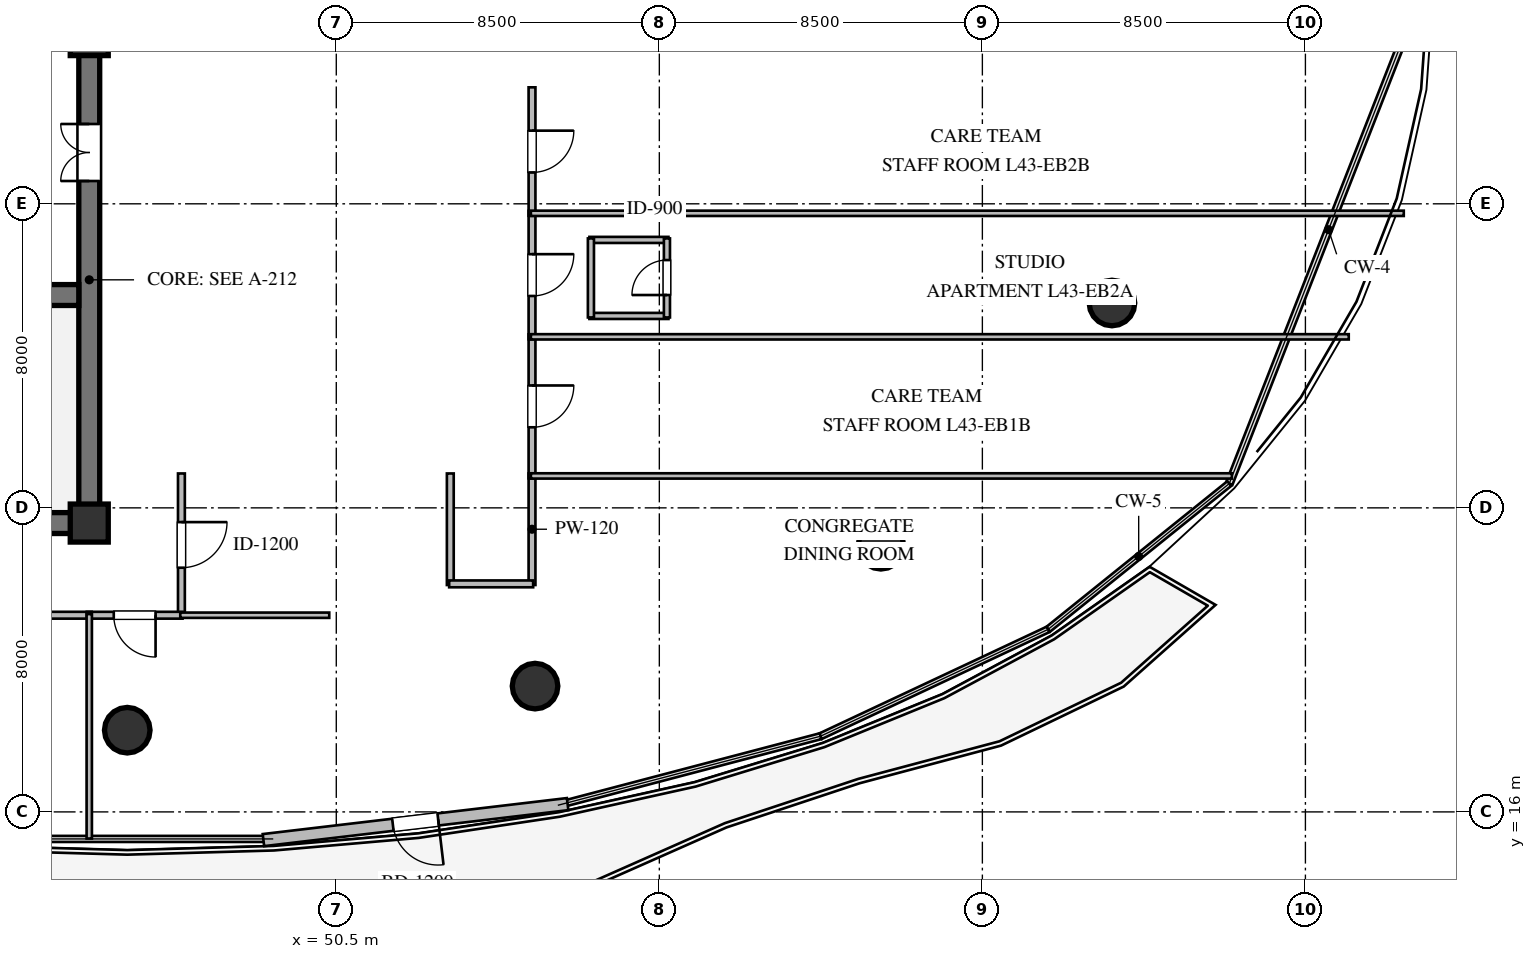
"""IFC4 building model, lengths in metres.
Left out: names, types, materials, properties, quantities, classifications, styles, units other than length and angle.
Written with IfcOpenShell. Run it as: python <this file> out.ifc"""

import sys

from ifc_helpers import new_model, si_unit, direction, frame, frame_2d, origin, origin_2d, place, context, subcontext, project, spatial, rectangle, circle, extrude, element, fill, save


model = new_model("IFC4")
c1 = context("Model", 3, precision=1e-05, world=origin(), true_north=direction((0.0, 1.0)))
c2 = subcontext(c1, "Body", "Model", "MODEL_VIEW")
j1 = project(units=[si_unit("LENGTHUNIT", "METRE"), si_unit("PLANEANGLEUNIT", "RADIAN")], contexts=[c1])
p1 = place(None, origin())
s1 = spatial("IfcSite", under=j1, at=p1, CompositionType="ELEMENT")
p2 = place(p1, origin())
s2 = spatial("IfcBuilding", under=s1, at=p2, CompositionType="ELEMENT")
p3 = place(p2, frame((0.0, 0.0, 163.8)))
s3 = spatial("IfcBuildingStorey", under=s2, at=p3, CompositionType="ELEMENT", Elevation=163.8)
p4 = place(p3, frame((21.725, 23.6, 0.0), z_axis=(0.0, 0.0, 1.0), x_axis=(1.0, 0.0, 0.0)))
e1 = element("IfcWall", 1, at=p4, inside=s3, PredefinedType="SHEAR", context=c2, shape_type="SweptSolid", body=[
    extrude(rectangle(XDim=22.55, YDim=0.55, at=frame_2d((11.275, 0.0))), origin(), (0.0, 0.0, 1.0), 3.36),
])
p5 = place(p3, frame((44.0, 23.875, 0.0), z_axis=(0.0, 0.0, 1.0), x_axis=(0.0, 1.0, 0.0)))
e2 = element("IfcWall", 2, at=p5, inside=s3, PredefinedType="SHEAR", context=c2, shape_type="SweptSolid", body=[
    extrude(rectangle(XDim=12.25, YDim=0.55, at=frame_2d((6.125, 0.0))), origin(), (0.0, 0.0, 1.0), 3.36),
])
p6 = place(p5, frame((8.725, 0.0, 0.0)))
e3 = element("IfcOpeningElement", 3, at=p6, cuts=e2, PredefinedType="OPENING", context=c2, shape_type="SweptSolid", body=[
    extrude(rectangle(XDim=1.5, YDim=2.15, at=frame_2d((0.75, 1.075))), frame((0.0, 0.285, 0.0), z_axis=(0.0, -1.0, 0.0), x_axis=(1.0, 0.0, 0.0)), (0.0, 0.0, 1.0), 0.57),
])
p7 = place(p3, frame((22.275, 29.6, 0.0), z_axis=(0.0, 0.0, 1.0), x_axis=(1.0, 0.0, 0.0)))
e4 = element("IfcWall", 4, at=p7, inside=s3, PredefinedType="SHEAR", context=c2, shape_type="SweptSolid", body=[
    extrude(rectangle(XDim=21.45, YDim=0.55, at=frame_2d((10.725, 0.0))), origin(), (0.0, 0.0, 1.0), 3.36),
])
p8 = place(p7, frame((12.175, 0.0, 0.0)))
e5 = element("IfcOpeningElement", 5, at=p8, cuts=e4, PredefinedType="OPENING", context=c2, shape_type="SweptSolid", body=[
    extrude(rectangle(XDim=1.15, YDim=2.1, at=frame_2d((0.575, 1.05))), frame((0.0, 0.285, 0.0), z_axis=(0.0, -1.0, 0.0), x_axis=(1.0, 0.0, 0.0)), (0.0, 0.0, 1.0), 0.57),
])
for number, where, z_axis, x_axis in (
    (6, (44.0, 23.6, 0.0), (0.0, 0.0, 1.0), (1.0, 0.0, 0.0)),
    (7, (44.0, 36.4, 0.0), (0.0, 0.0, 1.0), (1.0, 0.0, 0.0)),
):
    element("IfcColumn", number, at=place(p3, frame(where, z_axis=z_axis, x_axis=x_axis)), inside=s3, PredefinedType="COLUMN", context=c2, shape_type="SweptSolid", body=[
        extrude(rectangle(XDim=1.0, YDim=1.0, at=origin_2d()), origin(), (0.0, 0.0, 1.0), 3.6),
    ])
for number, where, z_axis, x_axis in (
    (8, (45.0, 18.15, 0.0), (0.0, 0.0, 1.0), (1.0, 0.0, 0.0)),
    (9, (55.73, 19.31, 0.0), (0.0, 0.0, 1.0), (1.0, 0.0, 0.0)),
    (10, (64.83, 22.99, 0.0), (0.0, 0.0, 1.0), (1.0, 0.0, 0.0)),
    (11, (70.91, 29.39, 0.0), (0.0, 0.0, 1.0), (1.0, 0.0, 0.0)),
):
    element("IfcColumn", number, at=place(p3, frame(where, z_axis=z_axis, x_axis=x_axis)), inside=s3, PredefinedType="COLUMN", context=c2, shape_type="SweptSolid", body=[
        extrude(circle(Radius=0.6, at=origin_2d()), origin(), (0.0, 0.0, 1.0), 3.6),
    ])
p9 = place(p3, frame((56.587, 16.205, 0.0), z_axis=(0.0, 0.0, 1.0), x_axis=(-0.993072847957, -0.117500292131, 0.0)))
e12 = element("IfcWall", 12, at=p9, inside=s3, PredefinedType="STANDARD", context=c2, shape_type="SweptSolid", body=[
    extrude(rectangle(XDim=8.06, YDim=0.32, at=frame_2d((4.03, 0.0))), origin(), (0.0, 0.0, 1.0), 3.36),
])
p10 = place(p9, frame((3.43, 0.0, 0.0)))
e13 = element("IfcOpeningElement", 13, at=p10, cuts=e12, PredefinedType="OPENING", context=c2, shape_type="SweptSolid", body=[
    extrude(rectangle(XDim=1.2, YDim=2.15, at=frame_2d((0.6, 1.075))), frame((0.0, 0.17, 0.0), z_axis=(0.0, -1.0, 0.0), x_axis=(1.0, 0.0, 0.0)), (0.0, 0.0, 1.0), 0.34),
])
for number, where, z_axis, x_axis in (
    (14, (57.16, 29.05, 0.0), (0.0, 0.0, 1.0), (1.0, 0.0, 0.0)),
    (15, (57.16, 31.05, 0.0), (0.0, 0.0, 1.0), (1.0, 0.0, 0.0)),
    (16, (57.2, 29.01, 0.0), (0.0, 0.0, 1.0), (0.0, 1.0, 0.0)),
):
    element("IfcWall", number, at=place(p3, frame(where, z_axis=z_axis, x_axis=x_axis)), inside=s3, PredefinedType="PLUMBINGWALL", context=c2, shape_type="SweptSolid", body=[
        extrude(rectangle(XDim=2.08, YDim=0.16, at=frame_2d((1.04, 0.0))), origin(), (0.0, 0.0, 1.0), 3.36),
    ])
p11 = place(p3, frame((59.2, 29.01, 0.0), z_axis=(0.0, 0.0, 1.0), x_axis=(0.0, 1.0, 0.0)))
e17 = element("IfcWall", 17, at=p11, inside=s3, PredefinedType="PLUMBINGWALL", context=c2, shape_type="SweptSolid", body=[
    extrude(rectangle(XDim=2.08, YDim=0.16, at=frame_2d((1.04, 0.0))), origin(), (0.0, 0.0, 1.0), 2.996),
])
p12 = place(p11, frame((0.59, 0.0, 0.0)))
e18 = element("IfcOpeningElement", 18, at=p12, cuts=e17, PredefinedType="OPENING", context=c2, shape_type="SweptSolid", body=[
    extrude(rectangle(XDim=0.92, YDim=2.1, at=frame_2d((0.46, 1.05))), frame((0.0, 0.09, 0.0), z_axis=(0.0, -1.0, 0.0), x_axis=(1.0, 0.0, 0.0)), (0.0, 0.0, 1.0), 0.18),
])
p13 = place(p3, frame((46.425, 24.905, 0.0), z_axis=(0.0, 0.0, 1.0), x_axis=(0.0, -1.0, 0.0)))
e19 = element("IfcWall", 19, at=p13, inside=s3, PredefinedType="PARTITIONING", context=c2, shape_type="SweptSolid", body=[
    extrude(rectangle(XDim=3.76, YDim=0.18, at=frame_2d((1.88, 0.0))), origin(), (0.0, 0.0, 1.0), 3.36),
])
p14 = place(p13, frame((1.28, 0.0, 0.0)))
e20 = element("IfcOpeningElement", 20, at=p14, cuts=e19, PredefinedType="OPENING", context=c2, shape_type="SweptSolid", body=[
    extrude(rectangle(XDim=1.2, YDim=2.15, at=frame_2d((0.6, 1.075))), frame((0.0, 0.1, 0.0), z_axis=(0.0, -1.0, 0.0), x_axis=(1.0, 0.0, 0.0)), (0.0, 0.0, 1.0), 0.2),
])
for number, where, z_axis, x_axis in (
    (21, (55.65, 24.905, 0.0), (0.0, 0.0, 1.0), (0.0, -1.0, 0.0)),
    (22, (53.5, 21.97, 0.0), (0.0, 0.0, 1.0), (0.0, 1.0, 0.0)),
):
    element("IfcWall", number, at=place(p3, frame(where, z_axis=z_axis, x_axis=x_axis)), inside=s3, PredefinedType="PARTITIONING", context=c2, shape_type="SweptSolid", body=[
        extrude(rectangle(XDim=2.935, YDim=0.18, at=frame_2d((1.468, 0.0))), origin(), (0.0, 0.0, 1.0), 3.36),
    ])
p15 = place(p3, frame((55.68, 22.0, 0.0), z_axis=(0.0, 0.0, 1.0), x_axis=(-1.0, 0.0, 0.0)))
e23 = element("IfcWall", 23, at=p15, inside=s3, PredefinedType="PARTITIONING", context=c2, shape_type="SweptSolid", body=[
    extrude(rectangle(XDim=2.21, YDim=0.18, at=frame_2d((1.105, 0.0))), origin(), (0.0, 0.0, 1.0), 3.36),
])
p16 = place(p3, frame((55.65, 28.565, 0.0), z_axis=(0.0, 0.0, 1.0), x_axis=(0.0, -1.0, 0.0)))
e24 = element("IfcWall", 24, at=p16, inside=s3, PredefinedType="PARTITIONING", context=c2, shape_type="SweptSolid", body=[
    extrude(rectangle(XDim=3.79, YDim=0.18, at=frame_2d((1.895, 0.0))), origin(), (0.0, 0.0, 1.0), 3.36),
])
p17 = place(p16, frame((1.345, 0.0, 0.0)))
e25 = element("IfcOpeningElement", 25, at=p17, cuts=e24, PredefinedType="OPENING", context=c2, shape_type="SweptSolid", body=[
    extrude(rectangle(XDim=1.1, YDim=2.1, at=frame_2d((0.55, 1.05))), frame((0.0, 0.1, 0.0), z_axis=(0.0, -1.0, 0.0), x_axis=(1.0, 0.0, 0.0)), (0.0, 0.0, 1.0), 0.2),
])
p18 = place(p3, frame((55.65, 31.815, 0.0), z_axis=(0.0, 0.0, 1.0), x_axis=(0.0, -1.0, 0.0)))
e26 = element("IfcWall", 26, at=p18, inside=s3, PredefinedType="PARTITIONING", context=c2, shape_type="SweptSolid", body=[
    extrude(rectangle(XDim=3.38, YDim=0.18, at=frame_2d((1.69, 0.0))), origin(), (0.0, 0.0, 1.0), 3.36),
])
p19 = place(p18, frame((1.14, 0.0, 0.0)))
e27 = element("IfcOpeningElement", 27, at=p19, cuts=e26, PredefinedType="OPENING", context=c2, shape_type="SweptSolid", body=[
    extrude(rectangle(XDim=1.1, YDim=2.1, at=frame_2d((0.55, 1.05))), frame((0.0, 0.1, 0.0), z_axis=(0.0, -1.0, 0.0), x_axis=(1.0, 0.0, 0.0)), (0.0, 0.0, 1.0), 0.2),
])
p20 = place(p3, frame((55.65, 35.065, 0.0), z_axis=(0.0, 0.0, 1.0), x_axis=(0.0, -1.0, 0.0)))
e28 = element("IfcWall", 28, at=p20, inside=s3, PredefinedType="PARTITIONING", context=c2, shape_type="SweptSolid", body=[
    extrude(rectangle(XDim=3.38, YDim=0.18, at=frame_2d((1.69, 0.0))), origin(), (0.0, 0.0, 1.0), 3.36),
])
p21 = place(p20, frame((1.14, 0.0, 0.0)))
e29 = element("IfcOpeningElement", 29, at=p21, cuts=e28, PredefinedType="OPENING", context=c2, shape_type="SweptSolid", body=[
    extrude(rectangle(XDim=1.1, YDim=2.1, at=frame_2d((0.55, 1.05))), frame((0.0, 0.1, 0.0), z_axis=(0.0, -1.0, 0.0), x_axis=(1.0, 0.0, 0.0)), (0.0, 0.0, 1.0), 0.2),
])
p22 = place(p3, frame((44.065, 21.175, 0.0), z_axis=(0.0, 0.0, 1.0), x_axis=(-1.0, 0.0, 0.0)))
e30 = element("IfcWall", 30, at=p22, inside=s3, PredefinedType="PARTITIONING", context=c2, shape_type="SweptSolid", body=[
    extrude(rectangle(XDim=14.13, YDim=0.18, at=frame_2d((7.065, 0.0))), origin(), (0.0, 0.0, 1.0), 2.657),
])
p23 = place(p22, frame((6.515, 0.0, 0.0)))
e31 = element("IfcOpeningElement", 31, at=p23, cuts=e30, PredefinedType="OPENING", context=c2, shape_type="SweptSolid", body=[
    extrude(rectangle(XDim=1.1, YDim=2.1, at=frame_2d((0.55, 1.05))), frame((0.0, 0.1, 0.0), z_axis=(0.0, -1.0, 0.0), x_axis=(1.0, 0.0, 0.0)), (0.0, 0.0, 1.0), 0.2),
])
p24 = place(p3, frame((46.455, 21.175, 0.0), z_axis=(0.0, 0.0, 1.0), x_axis=(-1.0, 0.0, 0.0)))
e32 = element("IfcWall", 32, at=p24, inside=s3, PredefinedType="PARTITIONING", context=c2, shape_type="SweptSolid", body=[
    extrude(rectangle(XDim=2.52, YDim=0.18, at=frame_2d((1.26, 0.0))), origin(), (0.0, 0.0, 1.0), 2.996),
])
p25 = place(p24, frame((0.71, 0.0, 0.0)))
e33 = element("IfcOpeningElement", 33, at=p25, cuts=e32, PredefinedType="OPENING", context=c2, shape_type="SweptSolid", body=[
    extrude(rectangle(XDim=1.1, YDim=2.1, at=frame_2d((0.55, 1.05))), frame((0.0, 0.1, 0.0), z_axis=(0.0, -1.0, 0.0), x_axis=(1.0, 0.0, 0.0)), (0.0, 0.0, 1.0), 0.2),
])
p26 = place(p3, frame((55.62, 24.84, 0.0), z_axis=(0.0, 0.0, 1.0), x_axis=(1.0, 0.0, 0.0)))
e34 = element("IfcWall", 34, at=p26, inside=s3, PredefinedType="PARTITIONING", context=c2, shape_type="SweptSolid", body=[
    extrude(rectangle(XDim=18.445, YDim=0.14, at=frame_2d((9.222, 0.0))), origin(), (0.0, 0.0, 1.0), 3.36),
])
p27 = place(p3, frame((50.315, 21.175, 0.0), z_axis=(0.0, 0.0, 1.0), x_axis=(-1.0, 0.0, 0.0)))
e35 = element("IfcWall", 35, at=p27, inside=s3, PredefinedType="PARTITIONING", context=c2, shape_type="SweptSolid", body=[
    extrude(rectangle(XDim=3.92, YDim=0.14, at=frame_2d((1.96, 0.0))), origin(), (0.0, 0.0, 1.0), 2.996),
])
p28 = place(p3, frame((55.62, 28.5, 0.0), z_axis=(0.0, 0.0, 1.0), x_axis=(1.0, 0.0, 0.0)))
e36 = element("IfcWall", 36, at=p28, inside=s3, PredefinedType="PARTITIONING", context=c2, shape_type="SweptSolid", body=[
    extrude(rectangle(XDim=21.52, YDim=0.14, at=frame_2d((10.76, 0.0))), origin(), (0.0, 0.0, 1.0), 2.89),
])
p29 = place(p3, frame((55.62, 31.75, 0.0), z_axis=(0.0, 0.0, 1.0), x_axis=(1.0, 0.0, 0.0)))
e37 = element("IfcWall", 37, at=p29, inside=s3, PredefinedType="PARTITIONING", context=c2, shape_type="SweptSolid", body=[
    extrude(rectangle(XDim=22.968, YDim=0.14, at=frame_2d((11.484, 0.0))), origin(), (0.0, 0.0, 1.0), 3.36),
])
p30 = place(p3, frame((44.0, 21.205, 0.0), z_axis=(0.0, 0.0, 1.0), x_axis=(0.0, -1.0, 0.0)))
e38 = element("IfcWall", 38, at=p30, inside=s3, PredefinedType="PARTITIONING", context=c2, shape_type="SweptSolid", body=[
    extrude(rectangle(XDim=5.906, YDim=0.14, at=frame_2d((2.953, 0.0))), origin(), (0.0, 0.0, 1.0), 2.89),
])
p31 = place(p10, origin())
e39 = element("IfcDoor", 39, at=p31, inside=s3, OperationType="SINGLE_SWING_LEFT", PredefinedType="DOOR", context=c2, shape_type="SweptSolid", body=[
    extrude(rectangle(XDim=1.2, YDim=2.15, at=frame_2d((0.6, 1.075))), frame((0.0, 0.025, 0.0), z_axis=(0.0, -1.0, 0.0), x_axis=(1.0, 0.0, 0.0)), (0.0, 0.0, 1.0), 0.05),
])
fill(e13, e39)
p32 = place(p6, origin())
e40 = element("IfcDoor", 40, at=p32, inside=s3, OperationType="DOUBLE_DOOR_SINGLE_SWING", PredefinedType="DOOR", context=c2, shape_type="SweptSolid", body=[
    extrude(rectangle(XDim=1.5, YDim=2.15, at=frame_2d((0.75, 1.075))), frame((0.0, 0.025, 0.0), z_axis=(0.0, -1.0, 0.0), x_axis=(1.0, 0.0, 0.0)), (0.0, 0.0, 1.0), 0.05),
])
fill(e3, e40)
p33 = place(p12, origin())
e41 = element("IfcDoor", 41, at=p33, inside=s3, OperationType="SINGLE_SWING_LEFT", PredefinedType="DOOR", context=c2, shape_type="SweptSolid", body=[
    extrude(rectangle(XDim=0.92, YDim=2.1, at=frame_2d((0.46, 1.05))), frame((0.0, 0.025, 0.0), z_axis=(0.0, -1.0, 0.0), x_axis=(1.0, 0.0, 0.0)), (0.0, 0.0, 1.0), 0.05),
])
fill(e18, e41)
p34 = place(p14, origin())
e42 = element("IfcDoor", 42, at=p34, inside=s3, OperationType="SINGLE_SWING_LEFT", PredefinedType="DOOR", context=c2, shape_type="SweptSolid", body=[
    extrude(rectangle(XDim=1.2, YDim=2.15, at=frame_2d((0.6, 1.075))), frame((0.0, 0.025, 0.0), z_axis=(0.0, -1.0, 0.0), x_axis=(1.0, 0.0, 0.0)), (0.0, 0.0, 1.0), 0.05),
])
fill(e20, e42)
p35 = place(p17, origin())
e43 = element("IfcDoor", 43, at=p35, inside=s3, OperationType="SINGLE_SWING_LEFT", PredefinedType="DOOR", context=c2, shape_type="SweptSolid", body=[
    extrude(rectangle(XDim=1.1, YDim=2.1, at=frame_2d((0.55, 1.05))), frame((0.0, 0.025, 0.0), z_axis=(0.0, -1.0, 0.0), x_axis=(1.0, 0.0, 0.0)), (0.0, 0.0, 1.0), 0.05),
])
fill(e25, e43)
p36 = place(p19, origin())
e44 = element("IfcDoor", 44, at=p36, inside=s3, OperationType="SINGLE_SWING_LEFT", PredefinedType="DOOR", context=c2, shape_type="SweptSolid", body=[
    extrude(rectangle(XDim=1.1, YDim=2.1, at=frame_2d((0.55, 1.05))), frame((0.0, 0.025, 0.0), z_axis=(0.0, -1.0, 0.0), x_axis=(1.0, 0.0, 0.0)), (0.0, 0.0, 1.0), 0.05),
])
fill(e27, e44)
p37 = place(p21, origin())
e45 = element("IfcDoor", 45, at=p37, inside=s3, OperationType="SINGLE_SWING_LEFT", PredefinedType="DOOR", context=c2, shape_type="SweptSolid", body=[
    extrude(rectangle(XDim=1.1, YDim=2.1, at=frame_2d((0.55, 1.05))), frame((0.0, 0.025, 0.0), z_axis=(0.0, -1.0, 0.0), x_axis=(1.0, 0.0, 0.0)), (0.0, 0.0, 1.0), 0.05),
])
fill(e29, e45)
p38 = place(p25, origin())
e46 = element("IfcDoor", 46, at=p38, inside=s3, OperationType="SINGLE_SWING_LEFT", PredefinedType="DOOR", context=c2, shape_type="SweptSolid", body=[
    extrude(rectangle(XDim=1.1, YDim=2.1, at=frame_2d((0.55, 1.05))), frame((0.0, 0.025, 0.0), z_axis=(0.0, -1.0, 0.0), x_axis=(1.0, 0.0, 0.0)), (0.0, 0.0, 1.0), 0.05),
])
fill(e33, e46)
save(model, sys.argv[1])
